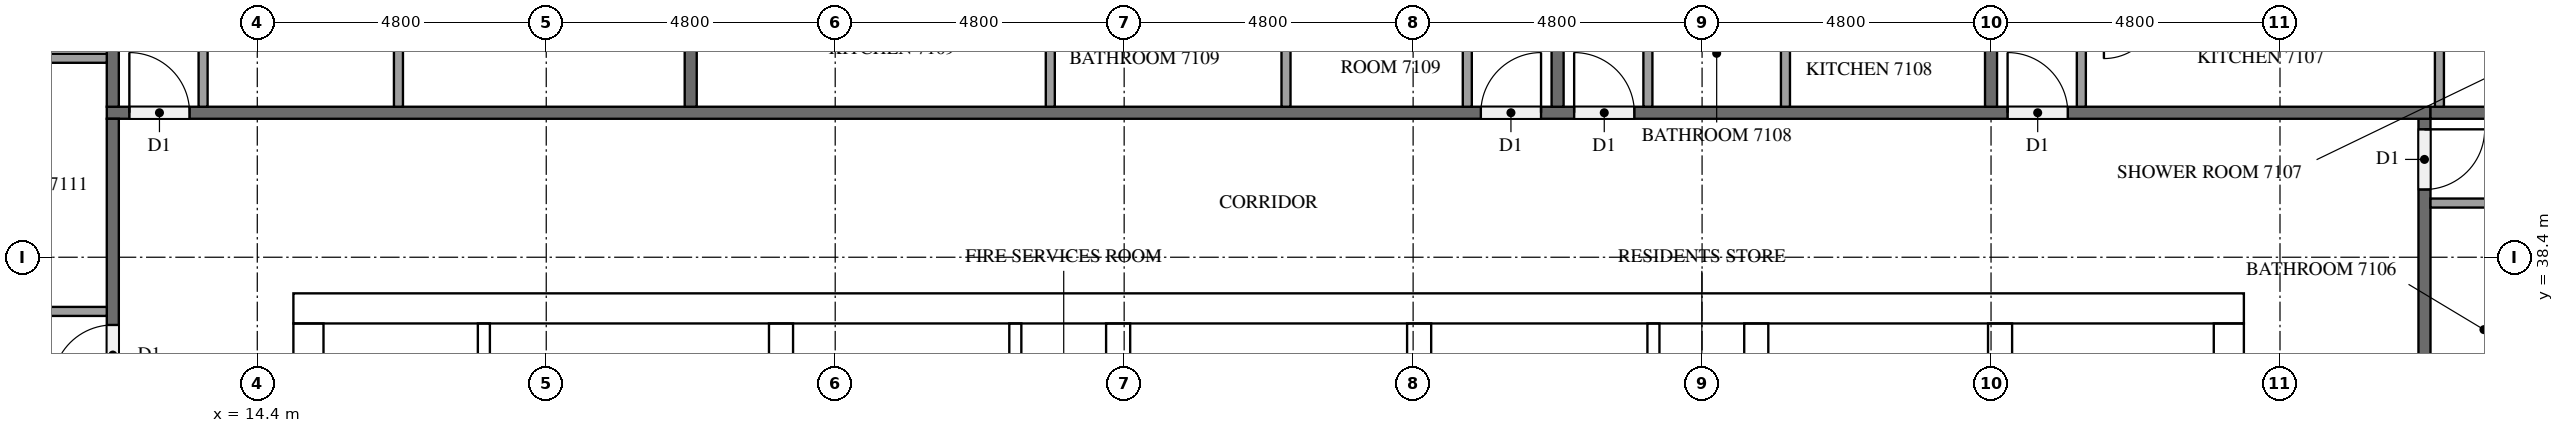
"""IFC4 building model, lengths in metres.
Left out: names, types, materials, properties, quantities, classifications, styles, units other than length and angle.
Written with IfcOpenShell. Run it as: python <this file> out.ifc"""

import sys

from ifc_helpers import new_model, si_unit, direction, frame, frame_2d, origin, place, context, subcontext, project, spatial, rectangle, extrude, element, fill, save


model = new_model("IFC4")
c1 = context("Model", 3, precision=1e-05, world=origin(), true_north=direction((0.0, 1.0)))
c2 = subcontext(c1, "Body", "Model", "MODEL_VIEW")
j1 = project(units=[si_unit("LENGTHUNIT", "METRE"), si_unit("PLANEANGLEUNIT", "RADIAN")], contexts=[c1])
p1 = place(None, origin())
s1 = spatial("IfcSite", under=j1, at=p1, CompositionType="ELEMENT")
p2 = place(p1, origin())
s2 = spatial("IfcBuilding", under=s1, at=p2, CompositionType="ELEMENT")
p3 = place(p2, frame((0.0, 0.0, 272.1)))
s3 = spatial("IfcBuildingStorey", under=s2, at=p3, CompositionType="ELEMENT", Elevation=272.1)
p4 = place(p3, frame((15.0, 37.55, 0.0), z_axis=(0.0, 0.0, 1.0), x_axis=(1.0, 0.0, 0.0)))
e1 = element("IfcWall", 1, at=p4, inside=s3, PredefinedType="SHEAR", context=c2, shape_type="SweptSolid", body=[
    extrude(rectangle(XDim=32.4, YDim=0.5, at=frame_2d((16.2, 0.0))), origin(), (0.0, 0.0, 1.0), 3.2),
])
p5 = place(p4, frame((15.3, 0.0, 0.0)))
e2 = element("IfcOpeningElement", 2, at=p5, cuts=e1, PredefinedType="OPENING", context=c2, shape_type="SweptSolid", body=[
    extrude(rectangle(XDim=1.8, YDim=2.1, at=frame_2d((0.9, 1.05))), frame((0.0, 0.26, 0.0), z_axis=(0.0, -1.0, 0.0), x_axis=(1.0, 0.0, 0.0)), (0.0, 0.0, 1.0), 0.52),
])
p6 = place(p4, frame((1.282, 0.0, 0.0)))
e3 = element("IfcOpeningElement", 3, at=p6, cuts=e1, PredefinedType="OPENING", context=c2, shape_type="SweptSolid", body=[
    extrude(rectangle(XDim=1.0, YDim=2.1, at=frame_2d((0.5, 1.05))), frame((0.0, 0.26, 0.0), z_axis=(0.0, -1.0, 0.0), x_axis=(1.0, 0.0, 0.0)), (0.0, 0.0, 1.0), 0.52),
])
p7 = place(p4, frame((5.082, 0.0, 0.0)))
e4 = element("IfcOpeningElement", 4, at=p7, cuts=e1, PredefinedType="OPENING", context=c2, shape_type="SweptSolid", body=[
    extrude(rectangle(XDim=1.0, YDim=2.1, at=frame_2d((0.5, 1.05))), frame((0.0, 0.26, 0.0), z_axis=(0.0, -1.0, 0.0), x_axis=(1.0, 0.0, 0.0)), (0.0, 0.0, 1.0), 0.52),
])
p8 = place(p3, frame((15.25, 15.5, 0.0), z_axis=(0.0, 0.0, 1.0), x_axis=(0.0, 1.0, 0.0)))
e5 = element("IfcWall", 5, at=p8, inside=s3, PredefinedType="SHEAR", context=c2, shape_type="SweptSolid", body=[
    extrude(rectangle(XDim=21.8, YDim=0.5, at=frame_2d((10.9, 0.0))), origin(), (0.0, 0.0, 1.0), 3.2),
])
p9 = place(p8, frame((5.26, 0.0, 0.0)))
e6 = element("IfcOpeningElement", 6, at=p9, cuts=e5, PredefinedType="OPENING", context=c2, shape_type="SweptSolid", body=[
    extrude(rectangle(XDim=1.2, YDim=2.1, at=frame_2d((0.6, 1.05))), frame((0.0, 0.26, 0.0), z_axis=(0.0, -1.0, 0.0), x_axis=(1.0, 0.0, 0.0)), (0.0, 0.0, 1.0), 0.52),
])
p10 = place(p3, frame((47.15, 15.5, 0.0), z_axis=(0.0, 0.0, 1.0), x_axis=(0.0, 1.0, 0.0)))
e7 = element("IfcWall", 7, at=p10, inside=s3, PredefinedType="SHEAR", context=c2, shape_type="SweptSolid", body=[
    extrude(rectangle(XDim=21.8, YDim=0.5, at=frame_2d((10.9, 0.0))), origin(), (0.0, 0.0, 1.0), 3.2),
])
p11 = place(p10, frame((10.6, 0.0, 0.0)))
e8 = element("IfcOpeningElement", 8, at=p11, cuts=e7, PredefinedType="OPENING", context=c2, shape_type="SweptSolid", body=[
    extrude(rectangle(XDim=1.2, YDim=2.1, at=frame_2d((0.6, 1.05))), frame((0.0, 0.26, 0.0), z_axis=(0.0, -1.0, 0.0), x_axis=(1.0, 0.0, 0.0)), (0.0, 0.0, 1.0), 0.52),
])
p12 = place(p3, frame((23.1, 15.5, 0.0), z_axis=(0.0, 0.0, 1.0), x_axis=(0.0, 1.0, 0.0)))
e9 = element("IfcWall", 9, at=p12, inside=s3, PredefinedType="SHEAR", context=c2, shape_type="SweptSolid", body=[
    extrude(rectangle(XDim=21.8, YDim=0.4, at=frame_2d((10.9, 0.0))), origin(), (0.0, 0.0, 1.0), 3.2),
])
p13 = place(p3, frame((39.3, 27.75, 0.0), z_axis=(0.0, 0.0, 1.0), x_axis=(0.0, 1.0, 0.0)))
e10 = element("IfcWall", 10, at=p13, inside=s3, PredefinedType="SHEAR", context=c2, shape_type="SweptSolid", body=[
    extrude(rectangle(XDim=9.55, YDim=0.4, at=frame_2d((4.775, 0.0))), origin(), (0.0, 0.0, 1.0), 3.2),
])
p14 = place(p3, frame((43.35, 27.75, 0.0), z_axis=(0.0, 0.0, 1.0), x_axis=(0.0, 1.0, 0.0)))
e11 = element("IfcWall", 11, at=p14, inside=s3, PredefinedType="SHEAR", context=c2, shape_type="SweptSolid", body=[
    extrude(rectangle(XDim=9.55, YDim=0.4, at=frame_2d((4.775, 0.0))), origin(), (0.0, 0.0, 1.0), 3.2),
])
p15 = place(p14, frame((7.65, 0.0, 0.0)))
e12 = element("IfcOpeningElement", 12, at=p15, cuts=e11, PredefinedType="OPENING", context=c2, shape_type="SweptSolid", body=[
    extrude(rectangle(XDim=1.2, YDim=2.1, at=frame_2d((0.6, 1.05))), frame((0.0, 0.21, 0.0), z_axis=(0.0, -1.0, 0.0), x_axis=(1.0, 0.0, 0.0)), (0.0, 0.0, 1.0), 0.42),
])
for number, where, z_axis, x_axis in (
    (13, (28.7, 33.75, 0.0), (0.0, 0.0, 1.0), (0.0, 1.0, 0.0)),
    (14, (33.7, 33.75, 0.0), (0.0, 0.0, 1.0), (0.0, 1.0, 0.0)),
):
    element("IfcWall", number, at=place(p3, frame(where, z_axis=z_axis, x_axis=x_axis)), inside=s3, PredefinedType="SHEAR", context=c2, shape_type="SweptSolid", body=[
        extrude(rectangle(XDim=3.55, YDim=0.4, at=frame_2d((1.775, 0.0))), origin(), (0.0, 0.0, 1.0), 3.2),
    ])
p16 = place(p3, frame((18.164, 31.45, 0.0), z_axis=(0.0, 0.0, 1.0), x_axis=(0.0, 1.0, 0.0)))
e15 = element("IfcWall", 15, at=p16, inside=s3, PredefinedType="PARTITIONING", context=c2, shape_type="SweptSolid", body=[
    extrude(rectangle(XDim=5.85, YDim=0.2, at=frame_2d((2.925, 0.0))), origin(), (0.0, 0.0, 1.0), 3.2),
])
for number, where, z_axis, x_axis in (
    (16, (26.992, 33.75, 0.0), (0.0, 0.0, 1.0), (0.0, 1.0, 0.0)),
    (17, (37.592, 33.75, 0.0), (0.0, 0.0, 1.0), (0.0, 1.0, 0.0)),
):
    element("IfcWall", number, at=place(p3, frame(where, z_axis=z_axis, x_axis=x_axis)), inside=s3, PredefinedType="PARTITIONING", context=c2, shape_type="SweptSolid", body=[
        extrude(rectangle(XDim=3.55, YDim=0.2, at=frame_2d((1.775, 0.0))), origin(), (0.0, 0.0, 1.0), 3.2),
    ])
p17 = place(p3, frame((50.4, 40.7, 0.0), z_axis=(0.0, 0.0, 1.0), x_axis=(0.0, -1.0, 0.0)))
e18 = element("IfcWall", 18, at=p17, inside=s3, PredefinedType="PARTITIONING", context=c2, shape_type="SweptSolid", body=[
    extrude(rectangle(XDim=28.6, YDim=0.2, at=frame_2d((14.3, 0.0))), origin(), (0.0, 0.0, 1.0), 3.2),
])
p18 = place(p17, frame((27.425, 0.0, 0.0)))
e19 = element("IfcOpeningElement", 19, at=p18, cuts=e18, PredefinedType="OPENING", context=c2, shape_type="SweptSolid", body=[
    extrude(rectangle(XDim=1.0, YDim=2.1, at=frame_2d((0.5, 1.05))), frame((0.0, 0.11, 0.0), z_axis=(0.0, -1.0, 0.0), x_axis=(1.0, 0.0, 0.0)), (0.0, 0.0, 1.0), 0.22),
])
p19 = place(p17, frame((0.175, 0.0, 0.0)))
e20 = element("IfcOpeningElement", 20, at=p19, cuts=e18, PredefinedType="OPENING", context=c2, shape_type="SweptSolid", body=[
    extrude(rectangle(XDim=1.0, YDim=2.1, at=frame_2d((0.5, 1.05))), frame((0.0, 0.11, 0.0), z_axis=(0.0, -1.0, 0.0), x_axis=(1.0, 0.0, 0.0)), (0.0, 0.0, 1.0), 0.22),
])
p20 = place(p3, frame((11.9, 40.8, 0.0), z_axis=(0.0, 0.0, 1.0), x_axis=(1.0, 0.0, 0.0)))
e21 = element("IfcWall", 21, at=p20, inside=s3, PredefinedType="PARTITIONING", context=c2, shape_type="SweptSolid", body=[
    extrude(rectangle(XDim=38.6, YDim=0.2, at=frame_2d((19.3, 0.0))), origin(), (0.0, 0.0, 1.0), 3.2),
])
p21 = place(p20, frame((31.575, 0.0, 0.0)))
e22 = element("IfcOpeningElement", 22, at=p21, cuts=e21, PredefinedType="OPENING", context=c2, shape_type="SweptSolid", body=[
    extrude(rectangle(XDim=1.0, YDim=2.1, at=frame_2d((0.5, 1.05))), frame((0.0, 0.11, 0.0), z_axis=(0.0, -1.0, 0.0), x_axis=(1.0, 0.0, 0.0)), (0.0, 0.0, 1.0), 0.22),
])
p22 = place(p20, frame((24.375, 0.0, 0.0)))
e23 = element("IfcOpeningElement", 23, at=p22, cuts=e21, PredefinedType="OPENING", context=c2, shape_type="SweptSolid", body=[
    extrude(rectangle(XDim=1.0, YDim=2.1, at=frame_2d((0.5, 1.05))), frame((0.0, 0.11, 0.0), z_axis=(0.0, -1.0, 0.0), x_axis=(1.0, 0.0, 0.0)), (0.0, 0.0, 1.0), 0.22),
])
p23 = place(p20, frame((22.825, 0.0, 0.0)))
e24 = element("IfcOpeningElement", 24, at=p23, cuts=e21, PredefinedType="OPENING", context=c2, shape_type="SweptSolid", body=[
    extrude(rectangle(XDim=1.0, YDim=2.1, at=frame_2d((0.5, 1.05))), frame((0.0, 0.11, 0.0), z_axis=(0.0, -1.0, 0.0), x_axis=(1.0, 0.0, 0.0)), (0.0, 0.0, 1.0), 0.22),
])
p24 = place(p20, frame((0.375, 0.0, 0.0)))
e25 = element("IfcOpeningElement", 25, at=p24, cuts=e21, PredefinedType="OPENING", context=c2, shape_type="SweptSolid", body=[
    extrude(rectangle(XDim=1.0, YDim=2.1, at=frame_2d((0.5, 1.05))), frame((0.0, 0.11, 0.0), z_axis=(0.0, -1.0, 0.0), x_axis=(1.0, 0.0, 0.0)), (0.0, 0.0, 1.0), 0.22),
])
p25 = place(p3, frame((12.0, 12.1, 0.0), z_axis=(0.0, 0.0, 1.0), x_axis=(0.0, 1.0, 0.0)))
e26 = element("IfcWall", 26, at=p25, inside=s3, PredefinedType="PARTITIONING", context=c2, shape_type="SweptSolid", body=[
    extrude(rectangle(XDim=28.6, YDim=0.2, at=frame_2d((14.3, 0.0))), origin(), (0.0, 0.0, 1.0), 3.2),
])
p26 = place(p25, frame((24.175, 0.0, 0.0)))
e27 = element("IfcOpeningElement", 27, at=p26, cuts=e26, PredefinedType="OPENING", context=c2, shape_type="SweptSolid", body=[
    extrude(rectangle(XDim=1.0, YDim=2.1, at=frame_2d((0.5, 1.05))), frame((0.0, 0.11, 0.0), z_axis=(0.0, -1.0, 0.0), x_axis=(1.0, 0.0, 0.0)), (0.0, 0.0, 1.0), 0.22),
])
p27 = place(p25, frame((14.575, 0.0, 0.0)))
e28 = element("IfcOpeningElement", 28, at=p27, cuts=e26, PredefinedType="OPENING", context=c2, shape_type="SweptSolid", body=[
    extrude(rectangle(XDim=1.0, YDim=2.1, at=frame_2d((0.5, 1.05))), frame((0.0, 0.11, 0.0), z_axis=(0.0, -1.0, 0.0), x_axis=(1.0, 0.0, 0.0)), (0.0, 0.0, 1.0), 0.22),
])
p28 = place(p25, frame((0.175, 0.0, 0.0)))
e29 = element("IfcOpeningElement", 29, at=p28, cuts=e26, PredefinedType="OPENING", context=c2, shape_type="SweptSolid", body=[
    extrude(rectangle(XDim=1.0, YDim=2.1, at=frame_2d((0.5, 1.05))), frame((0.0, 0.11, 0.0), z_axis=(0.0, -1.0, 0.0), x_axis=(1.0, 0.0, 0.0)), (0.0, 0.0, 1.0), 0.22),
])
p29 = place(p3, frame((50.5, 40.8, 0.0), z_axis=(0.0, 0.0, 1.0), x_axis=(1.0, 0.0, 0.0)))
e30 = element("IfcWall", 30, at=p29, inside=s3, PredefinedType="PARTITIONING", context=c2, shape_type="SweptSolid", body=[
    extrude(rectangle(XDim=7.0, YDim=0.2, at=frame_2d((3.5, 0.0))), origin(), (0.0, 0.0, 1.0), 3.2),
])
p30 = place(p3, frame((43.2, 47.75, 0.0), z_axis=(0.0, 0.0, 1.0), x_axis=(0.0, -1.0, 0.0)))
e31 = element("IfcWall", 31, at=p30, inside=s3, PredefinedType="PARTITIONING", context=c2, shape_type="SweptSolid", body=[
    extrude(rectangle(XDim=6.85, YDim=0.2, at=frame_2d((3.425, 0.0))), origin(), (0.0, 0.0, 1.0), 3.2),
])
for number, where, z_axis, x_axis in (
    (32, (36.0, 47.9, 0.0), (0.0, 0.0, 1.0), (0.0, -1.0, 0.0)),
    (33, (21.6, 47.9, 0.0), (0.0, 0.0, 1.0), (0.0, -1.0, 0.0)),
    (34, (12.0, 47.9, 0.0), (0.0, 0.0, 1.0), (0.0, -1.0, 0.0)),
):
    element("IfcWall", number, at=place(p3, frame(where, z_axis=z_axis, x_axis=x_axis)), inside=s3, PredefinedType="PARTITIONING", context=c2, shape_type="SweptSolid", body=[
        extrude(rectangle(XDim=7.0, YDim=0.2, at=frame_2d((3.5, 0.0))), origin(), (0.0, 0.0, 1.0), 3.2),
    ])
p31 = place(p3, frame((50.5, 39.3, 0.0), z_axis=(0.0, 0.0, 1.0), x_axis=(1.0, 0.0, 0.0)))
e35 = element("IfcWall", 35, at=p31, inside=s3, PredefinedType="PARTITIONING", context=c2, shape_type="SweptSolid", body=[
    extrude(rectangle(XDim=1.925, YDim=0.15, at=frame_2d((0.962, 0.0))), origin(), (0.0, 0.0, 1.0), 3.2),
])
p32 = place(p3, frame((50.648, 40.9, 0.0), z_axis=(0.0, 0.0, 1.0), x_axis=(0.0, 1.0, 0.0)))
e36 = element("IfcWall", 36, at=p32, inside=s3, PredefinedType="PARTITIONING", context=c2, shape_type="SweptSolid", body=[
    extrude(rectangle(XDim=1.625, YDim=0.15, at=frame_2d((0.812, 0.0))), origin(), (0.0, 0.0, 1.0), 3.2),
])
for number, where, z_axis, x_axis in (
    (37, (44.7, 40.9, 0.0), (0.0, 0.0, 1.0), (0.0, 1.0, 0.0)),
    (38, (39.785, 40.9, 0.0), (0.0, 0.0, 1.0), (0.0, 1.0, 0.0)),
):
    element("IfcWall", number, at=place(p3, frame(where, z_axis=z_axis, x_axis=x_axis)), inside=s3, PredefinedType="PARTITIONING", context=c2, shape_type="SweptSolid", body=[
        extrude(rectangle(XDim=1.775, YDim=0.15, at=frame_2d((0.888, 0.0))), origin(), (0.0, 0.0, 1.0), 3.2),
    ])
p33 = place(p3, frame((37.5, 40.9, 0.0), z_axis=(0.0, 0.0, 1.0), x_axis=(0.0, 1.0, 0.0)))
e39 = element("IfcWall", 39, at=p33, inside=s3, PredefinedType="PARTITIONING", context=c2, shape_type="SweptSolid", body=[
    extrude(rectangle(XDim=1.925, YDim=0.15, at=frame_2d((0.962, 0.0))), origin(), (0.0, 0.0, 1.0), 3.2),
])
for number, where, z_axis, x_axis in (
    (40, (31.489, 40.9, 0.0), (0.0, 0.0, 1.0), (0.0, 1.0, 0.0)),
    (41, (27.573, 40.9, 0.0), (0.0, 0.0, 1.0), (0.0, 1.0, 0.0)),
):
    element("IfcWall", number, at=place(p3, frame(where, z_axis=z_axis, x_axis=x_axis)), inside=s3, PredefinedType="PARTITIONING", context=c2, shape_type="SweptSolid", body=[
        extrude(rectangle(XDim=2.075, YDim=0.15, at=frame_2d((1.038, 0.0))), origin(), (0.0, 0.0, 1.0), 3.2),
    ])
p34 = place(p3, frame((34.5, 40.9, 0.0), z_axis=(0.0, 0.0, 1.0), x_axis=(0.0, 1.0, 0.0)))
e42 = element("IfcWall", 42, at=p34, inside=s3, PredefinedType="PARTITIONING", context=c2, shape_type="SweptSolid", body=[
    extrude(rectangle(XDim=2.225, YDim=0.15, at=frame_2d((1.113, 0.0))), origin(), (0.0, 0.0, 1.0), 3.2),
])
p35 = place(p3, frame((16.745, 40.9, 0.0), z_axis=(0.0, 0.0, 1.0), x_axis=(0.0, 1.0, 0.0)))
e43 = element("IfcWall", 43, at=p35, inside=s3, PredefinedType="PARTITIONING", context=c2, shape_type="SweptSolid", body=[
    extrude(rectangle(XDim=2.075, YDim=0.15, at=frame_2d((1.038, 0.0))), origin(), (0.0, 0.0, 1.0), 3.2),
])
p36 = place(p3, frame((13.5, 40.9, 0.0), z_axis=(0.0, 0.0, 1.0), x_axis=(0.0, 1.0, 0.0)))
e44 = element("IfcWall", 44, at=p36, inside=s3, PredefinedType="PARTITIONING", context=c2, shape_type="SweptSolid", body=[
    extrude(rectangle(XDim=2.225, YDim=0.15, at=frame_2d((1.113, 0.0))), origin(), (0.0, 0.0, 1.0), 3.2),
])
p37 = place(p3, frame((11.9, 41.705, 0.0), z_axis=(0.0, 0.0, 1.0), x_axis=(-1.0, 0.0, 0.0)))
e45 = element("IfcWall", 45, at=p37, inside=s3, PredefinedType="PARTITIONING", context=c2, shape_type="SweptSolid", body=[
    extrude(rectangle(XDim=3.125, YDim=0.15, at=frame_2d((1.562, 0.0))), origin(), (0.0, 0.0, 1.0), 3.2),
])
p38 = place(p3, frame((11.9, 37.5, 0.0), z_axis=(0.0, 0.0, 1.0), x_axis=(-1.0, 0.0, 0.0)))
e46 = element("IfcWall", 46, at=p38, inside=s3, PredefinedType="PARTITIONING", context=c2, shape_type="SweptSolid", body=[
    extrude(rectangle(XDim=3.275, YDim=0.15, at=frame_2d((1.637, 0.0))), origin(), (0.0, 0.0, 1.0), 3.2),
])
p39 = place(p5, origin())
e47 = element("IfcDoor", 47, at=p39, inside=s3, OperationType="DOUBLE_DOOR_SINGLE_SWING", PredefinedType="DOOR", context=c2, shape_type="SweptSolid", body=[
    extrude(rectangle(XDim=1.8, YDim=2.1, at=frame_2d((0.9, 1.05))), frame((0.0, 0.025, 0.0), z_axis=(0.0, -1.0, 0.0), x_axis=(1.0, 0.0, 0.0)), (0.0, 0.0, 1.0), 0.05),
])
fill(e2, e47)
p40 = place(p6, origin())
e48 = element("IfcDoor", 48, at=p40, inside=s3, OperationType="SINGLE_SWING_RIGHT", PredefinedType="DOOR", context=c2, shape_type="SweptSolid", body=[
    extrude(rectangle(XDim=1.0, YDim=2.1, at=frame_2d((0.5, 1.05))), frame((0.0, 0.025, 0.0), z_axis=(0.0, -1.0, 0.0), x_axis=(1.0, 0.0, 0.0)), (0.0, 0.0, 1.0), 0.05),
])
fill(e3, e48)
p41 = place(p7, origin())
e49 = element("IfcDoor", 49, at=p41, inside=s3, OperationType="SINGLE_SWING_LEFT", PredefinedType="DOOR", context=c2, shape_type="SweptSolid", body=[
    extrude(rectangle(XDim=1.0, YDim=2.1, at=frame_2d((0.5, 1.05))), frame((0.0, 0.025, 0.0), z_axis=(0.0, -1.0, 0.0), x_axis=(1.0, 0.0, 0.0)), (0.0, 0.0, 1.0), 0.05),
])
fill(e4, e49)
p42 = place(p19, origin())
e50 = element("IfcDoor", 50, at=p42, inside=s3, OperationType="SINGLE_SWING_LEFT", PredefinedType="DOOR", context=c2, shape_type="SweptSolid", body=[
    extrude(rectangle(XDim=1.0, YDim=2.1, at=frame_2d((0.5, 1.05))), frame((0.0, 0.025, 0.0), z_axis=(0.0, -1.0, 0.0), x_axis=(1.0, 0.0, 0.0)), (0.0, 0.0, 1.0), 0.05),
])
fill(e20, e50)
p43 = place(p21, origin())
e51 = element("IfcDoor", 51, at=p43, inside=s3, OperationType="SINGLE_SWING_LEFT", PredefinedType="DOOR", context=c2, shape_type="SweptSolid", body=[
    extrude(rectangle(XDim=1.0, YDim=2.1, at=frame_2d((0.5, 1.05))), frame((0.0, 0.025, 0.0), z_axis=(0.0, -1.0, 0.0), x_axis=(1.0, 0.0, 0.0)), (0.0, 0.0, 1.0), 0.05),
])
fill(e22, e51)
p44 = place(p22, origin())
e52 = element("IfcDoor", 52, at=p44, inside=s3, OperationType="SINGLE_SWING_LEFT", PredefinedType="DOOR", context=c2, shape_type="SweptSolid", body=[
    extrude(rectangle(XDim=1.0, YDim=2.1, at=frame_2d((0.5, 1.05))), frame((0.0, 0.025, 0.0), z_axis=(0.0, -1.0, 0.0), x_axis=(1.0, 0.0, 0.0)), (0.0, 0.0, 1.0), 0.05),
])
fill(e23, e52)
p45 = place(p23, origin())
e53 = element("IfcDoor", 53, at=p45, inside=s3, OperationType="SINGLE_SWING_RIGHT", PredefinedType="DOOR", context=c2, shape_type="SweptSolid", body=[
    extrude(rectangle(XDim=1.0, YDim=2.1, at=frame_2d((0.5, 1.05))), frame((0.0, 0.025, 0.0), z_axis=(0.0, -1.0, 0.0), x_axis=(1.0, 0.0, 0.0)), (0.0, 0.0, 1.0), 0.05),
])
fill(e24, e53)
p46 = place(p24, origin())
e54 = element("IfcDoor", 54, at=p46, inside=s3, OperationType="SINGLE_SWING_LEFT", PredefinedType="DOOR", context=c2, shape_type="SweptSolid", body=[
    extrude(rectangle(XDim=1.0, YDim=2.1, at=frame_2d((0.5, 1.05))), frame((0.0, 0.025, 0.0), z_axis=(0.0, -1.0, 0.0), x_axis=(1.0, 0.0, 0.0)), (0.0, 0.0, 1.0), 0.05),
])
fill(e25, e54)
p47 = place(p26, origin())
e55 = element("IfcDoor", 55, at=p47, inside=s3, OperationType="SINGLE_SWING_LEFT", PredefinedType="DOOR", context=c2, shape_type="SweptSolid", body=[
    extrude(rectangle(XDim=1.0, YDim=2.1, at=frame_2d((0.5, 1.05))), frame((0.0, 0.025, 0.0), z_axis=(0.0, -1.0, 0.0), x_axis=(1.0, 0.0, 0.0)), (0.0, 0.0, 1.0), 0.05),
])
fill(e27, e55)
save(model, sys.argv[1])
